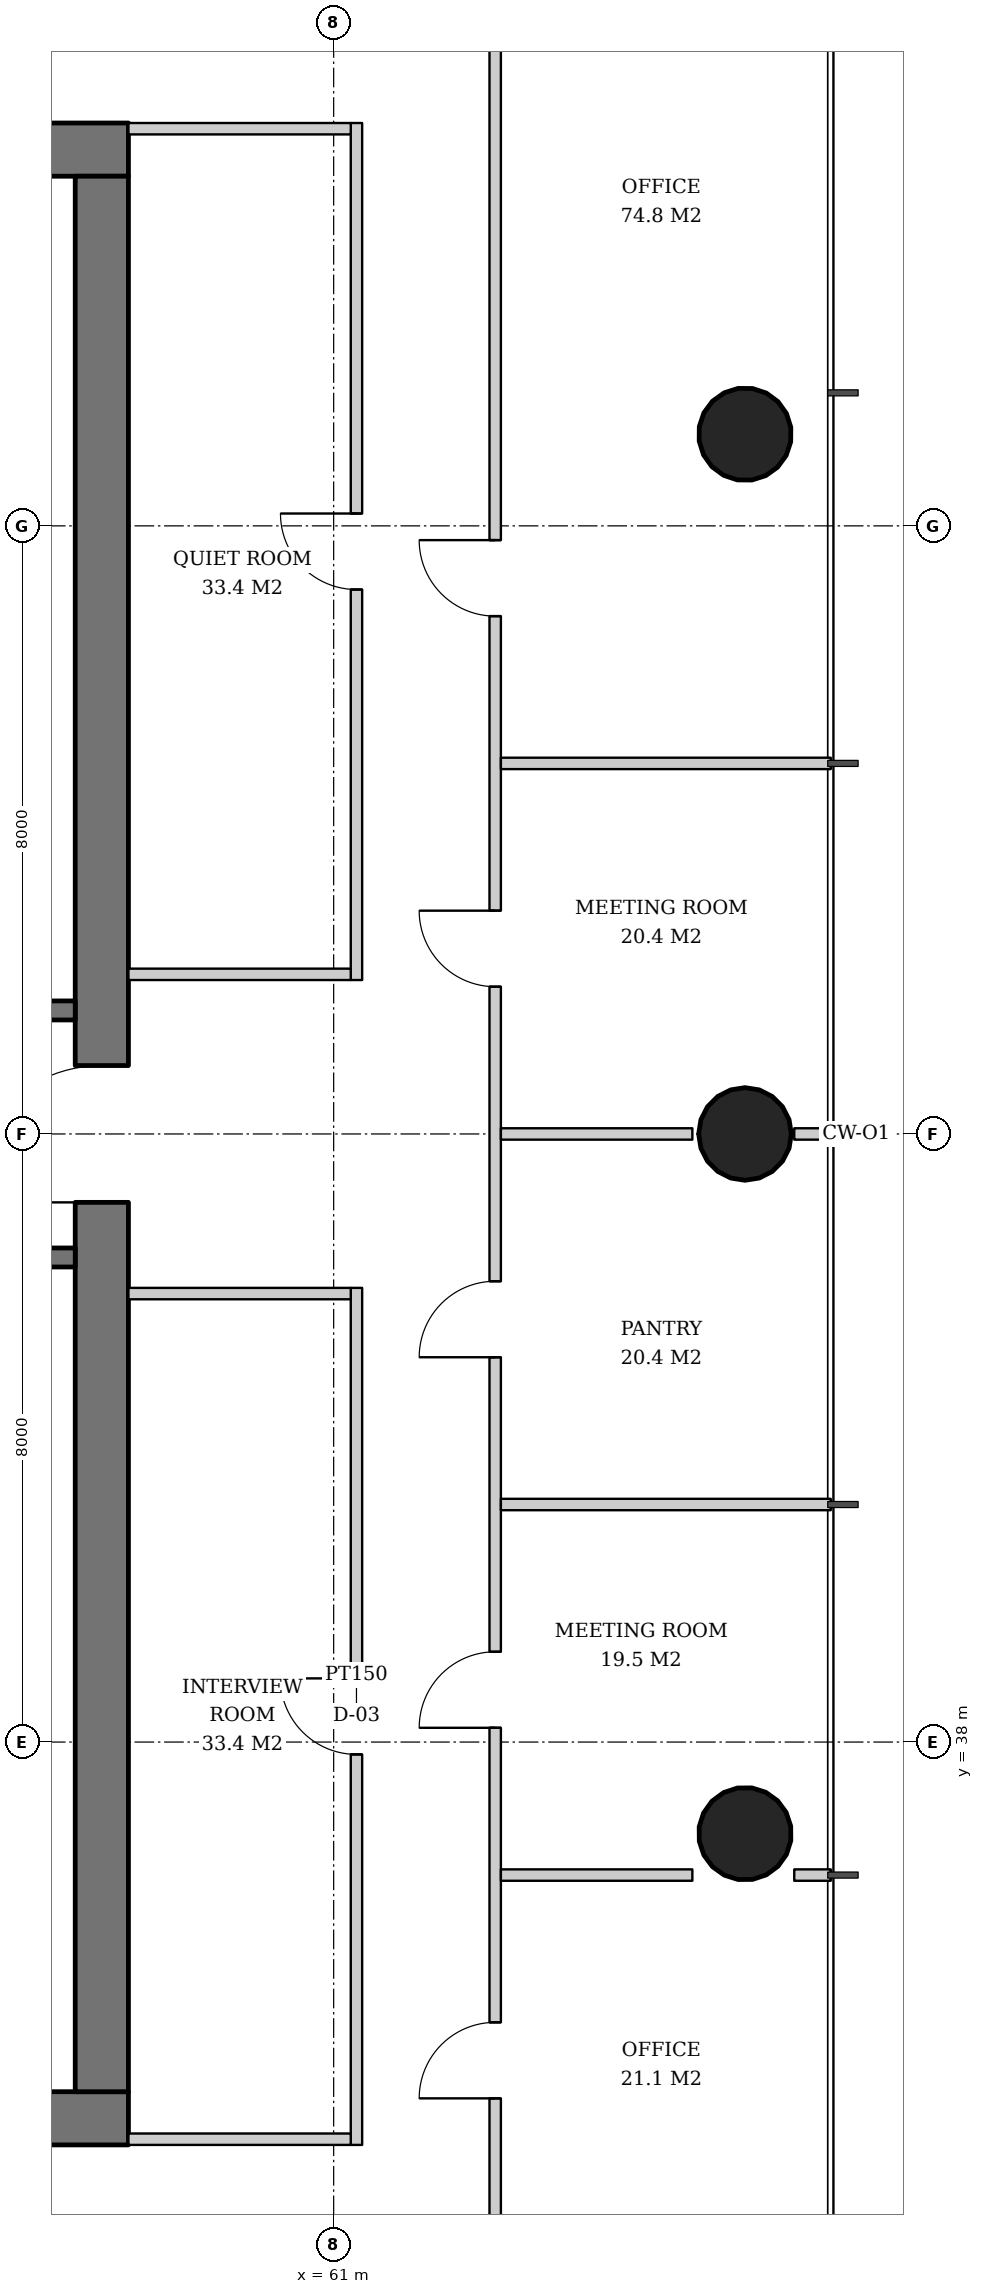
"""IFC4 building model, lengths in metres.
Left out: names, types, materials, properties, quantities, classifications, styles, units other than length and angle.
Written with IfcOpenShell. Run it as: python <this file> out.ifc"""

import sys

from ifc_helpers import new_model, si_unit, direction, frame, frame_2d, origin, origin_2d, place, context, subcontext, project, spatial, rectangle, hollow_circle, extrude, element, fill, save


model = new_model("IFC4")
c1 = context("Model", 3, precision=1e-05, world=origin(), true_north=direction((0.0, 1.0)))
c2 = subcontext(c1, "Body", "Model", "MODEL_VIEW")
j1 = project(units=[si_unit("LENGTHUNIT", "METRE"), si_unit("PLANEANGLEUNIT", "RADIAN")], contexts=[c1])
p1 = place(None, origin())
s1 = spatial("IfcSite", under=j1, at=p1, CompositionType="ELEMENT")
p2 = place(p1, origin())
s2 = spatial("IfcBuilding", under=s1, at=p2, CompositionType="ELEMENT")
p3 = place(p2, frame((0.0, 0.0, 100.8)))
s3 = spatial("IfcBuildingStorey", under=s2, at=p3, CompositionType="ELEMENT", Elevation=100.8)
p4 = place(p3, frame((66.45, 36.775, 0.0), z_axis=(-0.031910269556, 0.015987237665, 0.999362868496), x_axis=(-0.447933021895, -0.894067115991, 0.0)))
e1 = element("IfcColumn", 1, at=p4, inside=s3, PredefinedType="COLUMN", context=c2, shape_type="SweptSolid", body=[
    extrude(hollow_circle(Radius=0.61, WallThickness=0.04, at=origin_2d()), origin(), (0.0, 0.0, 1.0), 3.802),
])
p5 = place(p3, frame((66.45, 46.0, 0.0), z_axis=(-0.031914348339, 0.0, 0.999490607445), x_axis=(0.0, -1.0, 0.0)))
e2 = element("IfcColumn", 2, at=p5, inside=s3, PredefinedType="COLUMN", context=c2, shape_type="SweptSolid", body=[
    extrude(hollow_circle(Radius=0.61, WallThickness=0.04, at=origin_2d()), origin(), (0.0, 0.0, 1.0), 3.802),
])
p6 = place(p3, frame((66.45, 55.225, 0.0), z_axis=(-0.031910269556, -0.015987237665, 0.999362868496), x_axis=(0.447933021895, -0.894067115991, 0.0)))
e3 = element("IfcColumn", 3, at=p6, inside=s3, PredefinedType="COLUMN", context=c2, shape_type="SweptSolid", body=[
    extrude(hollow_circle(Radius=0.61, WallThickness=0.04, at=origin_2d()), origin(), (0.0, 0.0, 1.0), 3.802),
])
p7 = place(p3, frame((31.7, 33.05, 0.0), z_axis=(0.0, 0.0, 1.0), x_axis=(1.0, 0.0, 0.0)))
e4 = element("IfcWall", 4, at=p7, inside=s3, PredefinedType="SHEAR", context=c2, shape_type="SweptSolid", body=[
    extrude(rectangle(XDim=26.6, YDim=0.7, at=frame_2d((13.3, 0.0))), origin(), (0.0, 0.0, 1.0), 3.8),
])
p8 = place(p7, frame((7.3, 0.0, 0.0)))
e5 = element("IfcOpeningElement", 5, at=p8, cuts=e4, PredefinedType="OPENING", context=c2, shape_type="SweptSolid", body=[
    extrude(rectangle(XDim=1.0, YDim=2.1, at=frame_2d((0.5, 1.05))), frame((0.0, 0.36, 0.0), z_axis=(0.0, -1.0, 0.0), x_axis=(1.0, 0.0, 0.0)), (0.0, 0.0, 1.0), 0.72),
])
p9 = place(p7, frame((18.75, 0.0, 0.0)))
e6 = element("IfcOpeningElement", 6, at=p9, cuts=e4, PredefinedType="OPENING", context=c2, shape_type="SweptSolid", body=[
    extrude(rectangle(XDim=1.0, YDim=2.1, at=frame_2d((0.5, 1.05))), frame((0.0, 0.36, 0.0), z_axis=(0.0, -1.0, 0.0), x_axis=(1.0, 0.0, 0.0)), (0.0, 0.0, 1.0), 0.72),
])
p10 = place(p7, frame((3.2, 0.0, 0.0)))
e7 = element("IfcOpeningElement", 7, at=p10, cuts=e4, PredefinedType="OPENING", context=c2, shape_type="SweptSolid", body=[
    extrude(rectangle(XDim=1.0, YDim=2.1, at=frame_2d((0.5, 1.05))), frame((0.0, 0.36, 0.0), z_axis=(0.0, -1.0, 0.0), x_axis=(1.0, 0.0, 0.0)), (0.0, 0.0, 1.0), 0.72),
])
p11 = place(p7, frame((10.42, 0.0, 0.0)))
e8 = element("IfcOpeningElement", 8, at=p11, cuts=e4, PredefinedType="OPENING", context=c2, shape_type="SweptSolid", body=[
    extrude(rectangle(XDim=1.0, YDim=2.1, at=frame_2d((0.5, 1.05))), frame((0.0, 0.36, 0.0), z_axis=(0.0, -1.0, 0.0), x_axis=(1.0, 0.0, 0.0)), (0.0, 0.0, 1.0), 0.72),
])
p12 = place(p7, frame((14.46, 0.0, 0.0)))
e9 = element("IfcOpeningElement", 9, at=p12, cuts=e4, PredefinedType="OPENING", context=c2, shape_type="SweptSolid", body=[
    extrude(rectangle(XDim=1.0, YDim=2.1, at=frame_2d((0.5, 1.05))), frame((0.0, 0.36, 0.0), z_axis=(0.0, -1.0, 0.0), x_axis=(1.0, 0.0, 0.0)), (0.0, 0.0, 1.0), 0.72),
])
p13 = place(p7, frame((22.5, 0.0, 0.0)))
e10 = element("IfcOpeningElement", 10, at=p13, cuts=e4, PredefinedType="OPENING", context=c2, shape_type="SweptSolid", body=[
    extrude(rectangle(XDim=1.0, YDim=2.1, at=frame_2d((0.5, 1.05))), frame((0.0, 0.36, 0.0), z_axis=(0.0, -1.0, 0.0), x_axis=(1.0, 0.0, 0.0)), (0.0, 0.0, 1.0), 0.72),
])
p14 = place(p3, frame((31.7, 58.95, 0.0), z_axis=(0.0, 0.0, 1.0), x_axis=(1.0, 0.0, 0.0)))
e11 = element("IfcWall", 11, at=p14, inside=s3, PredefinedType="SHEAR", context=c2, shape_type="SweptSolid", body=[
    extrude(rectangle(XDim=26.6, YDim=0.7, at=frame_2d((13.3, 0.0))), origin(), (0.0, 0.0, 1.0), 3.8),
])
p15 = place(p14, frame((17.94, 0.0, 0.0)))
e12 = element("IfcOpeningElement", 12, at=p15, cuts=e11, PredefinedType="OPENING", context=c2, shape_type="SweptSolid", body=[
    extrude(rectangle(XDim=1.0, YDim=2.1, at=frame_2d((0.5, 1.05))), frame((0.0, 0.36, 0.0), z_axis=(0.0, -1.0, 0.0), x_axis=(1.0, 0.0, 0.0)), (0.0, 0.0, 1.0), 0.72),
])
p16 = place(p14, frame((5.825, 0.0, 0.0)))
e13 = element("IfcOpeningElement", 13, at=p16, cuts=e11, PredefinedType="OPENING", context=c2, shape_type="SweptSolid", body=[
    extrude(rectangle(XDim=1.0, YDim=2.1, at=frame_2d((0.5, 1.05))), frame((0.0, 0.36, 0.0), z_axis=(0.0, -1.0, 0.0), x_axis=(1.0, 0.0, 0.0)), (0.0, 0.0, 1.0), 0.72),
])
p17 = place(p14, frame((1.169, 0.0, 0.0)))
e14 = element("IfcOpeningElement", 14, at=p17, cuts=e11, PredefinedType="OPENING", context=c2, shape_type="SweptSolid", body=[
    extrude(rectangle(XDim=1.0, YDim=2.1, at=frame_2d((0.5, 1.05))), frame((0.0, 0.36, 0.0), z_axis=(0.0, -1.0, 0.0), x_axis=(1.0, 0.0, 0.0)), (0.0, 0.0, 1.0), 0.72),
])
p18 = place(p14, frame((3.447, 0.0, 0.0)))
e15 = element("IfcOpeningElement", 15, at=p18, cuts=e11, PredefinedType="OPENING", context=c2, shape_type="SweptSolid", body=[
    extrude(rectangle(XDim=1.0, YDim=2.1, at=frame_2d((0.5, 1.05))), frame((0.0, 0.36, 0.0), z_axis=(0.0, -1.0, 0.0), x_axis=(1.0, 0.0, 0.0)), (0.0, 0.0, 1.0), 0.72),
])
p19 = place(p14, frame((11.577, 0.0, 0.0)))
e16 = element("IfcOpeningElement", 16, at=p19, cuts=e11, PredefinedType="OPENING", context=c2, shape_type="SweptSolid", body=[
    extrude(rectangle(XDim=1.0, YDim=2.1, at=frame_2d((0.5, 1.05))), frame((0.0, 0.36, 0.0), z_axis=(0.0, -1.0, 0.0), x_axis=(1.0, 0.0, 0.0)), (0.0, 0.0, 1.0), 0.72),
])
p20 = place(p14, frame((20.9, 0.0, 0.0)))
e17 = element("IfcOpeningElement", 17, at=p20, cuts=e11, PredefinedType="OPENING", context=c2, shape_type="SweptSolid", body=[
    extrude(rectangle(XDim=1.0, YDim=2.1, at=frame_2d((0.5, 1.05))), frame((0.0, 0.36, 0.0), z_axis=(0.0, -1.0, 0.0), x_axis=(1.0, 0.0, 0.0)), (0.0, 0.0, 1.0), 0.72),
])
p21 = place(p14, frame((23.75, 0.0, 0.0)))
e18 = element("IfcOpeningElement", 18, at=p21, cuts=e11, PredefinedType="OPENING", context=c2, shape_type="SweptSolid", body=[
    extrude(rectangle(XDim=1.0, YDim=2.1, at=frame_2d((0.5, 1.05))), frame((0.0, 0.36, 0.0), z_axis=(0.0, -1.0, 0.0), x_axis=(1.0, 0.0, 0.0)), (0.0, 0.0, 1.0), 0.72),
])
p22 = place(p3, frame((57.95, 33.4, 0.0), z_axis=(0.0, 0.0, 1.0), x_axis=(0.0, 1.0, 0.0)))
e19 = element("IfcWall", 19, at=p22, inside=s3, PredefinedType="SHEAR", context=c2, shape_type="SweptSolid", body=[
    extrude(rectangle(XDim=25.2, YDim=0.7, at=frame_2d((12.6, 0.0))), origin(), (0.0, 0.0, 1.0), 3.8),
])
p23 = place(p22, frame((11.7, 0.0, 0.0)))
e20 = element("IfcOpeningElement", 20, at=p23, cuts=e19, PredefinedType="OPENING", context=c2, shape_type="SweptSolid", body=[
    extrude(rectangle(XDim=1.8, YDim=2.4, at=frame_2d((0.9, 1.2))), frame((0.0, 0.36, 0.0), z_axis=(0.0, -1.0, 0.0), x_axis=(1.0, 0.0, 0.0)), (0.0, 0.0, 1.0), 0.72),
])
for number, where, z_axis, x_axis in (
    (21, (54.9, 44.375, 0.0), (0.0, 0.0, 1.0), (1.0, 0.0, 0.0)),
    (22, (54.9, 47.625, 0.0), (0.0, 0.0, 1.0), (1.0, 0.0, 0.0)),
):
    element("IfcWall", number, at=place(p3, frame(where, z_axis=z_axis, x_axis=x_axis)), inside=s3, PredefinedType="SOLIDWALL", context=c2, shape_type="SweptSolid", body=[
        extrude(rectangle(XDim=2.7, YDim=0.25, at=frame_2d((1.35, 0.0))), origin(), (0.0, 0.0, 1.0), 3.62),
    ])
p24 = place(p3, frame((61.3, 32.7, 0.0), z_axis=(0.0, 0.0, 1.0), x_axis=(0.0, 1.0, 0.0)))
e23 = element("IfcWall", 23, at=p24, inside=s3, PredefinedType="PARTITIONING", context=c2, shape_type="SweptSolid", body=[
    extrude(rectangle(XDim=11.275, YDim=0.15, at=frame_2d((5.638, 0.0))), origin(), (0.0, 0.0, 1.0), 2.72),
])
p25 = place(p24, frame((5.137, 0.0, 0.0)))
e24 = element("IfcOpeningElement", 24, at=p25, cuts=e23, PredefinedType="OPENING", context=c2, shape_type="SweptSolid", body=[
    extrude(rectangle(XDim=1.0, YDim=2.1, at=frame_2d((0.5, 1.05))), frame((0.0, 0.085, 0.0), z_axis=(0.0, -1.0, 0.0), x_axis=(1.0, 0.0, 0.0)), (0.0, 0.0, 1.0), 0.17),
])
for number, where, z_axis, x_axis in (
    (25, (58.3, 32.775, 0.0), (0.0, 0.0, 1.0), (1.0, 0.0, 0.0)),
    (26, (58.3, 43.9, 0.0), (0.0, 0.0, 1.0), (1.0, 0.0, 0.0)),
):
    element("IfcWall", number, at=place(p3, frame(where, z_axis=z_axis, x_axis=x_axis)), inside=s3, PredefinedType="PARTITIONING", context=c2, shape_type="SweptSolid", body=[
        extrude(rectangle(XDim=2.925, YDim=0.15, at=frame_2d((1.462, 0.0))), origin(), (0.0, 0.0, 1.0), 3.62),
    ])
p26 = place(p3, frame((61.3, 48.025, 0.0), z_axis=(0.0, 0.0, 1.0), x_axis=(0.0, 1.0, 0.0)))
e27 = element("IfcWall", 27, at=p26, inside=s3, PredefinedType="PARTITIONING", context=c2, shape_type="SweptSolid", body=[
    extrude(rectangle(XDim=11.275, YDim=0.15, at=frame_2d((5.638, 0.0))), origin(), (0.0, 0.0, 1.0), 2.806),
])
p27 = place(p26, frame((5.137, 0.0, 0.0)))
e28 = element("IfcOpeningElement", 28, at=p27, cuts=e27, PredefinedType="OPENING", context=c2, shape_type="SweptSolid", body=[
    extrude(rectangle(XDim=1.0, YDim=2.1, at=frame_2d((0.5, 1.05))), frame((0.0, 0.085, 0.0), z_axis=(0.0, -1.0, 0.0), x_axis=(1.0, 0.0, 0.0)), (0.0, 0.0, 1.0), 0.17),
])
for number, where, z_axis, x_axis in (
    (29, (58.3, 48.1, 0.0), (0.0, 0.0, 1.0), (1.0, 0.0, 0.0)),
    (30, (58.3, 59.225, 0.0), (0.0, 0.0, 1.0), (1.0, 0.0, 0.0)),
):
    element("IfcWall", number, at=place(p3, frame(where, z_axis=z_axis, x_axis=x_axis)), inside=s3, PredefinedType="PARTITIONING", context=c2, shape_type="SweptSolid", body=[
        extrude(rectangle(XDim=2.925, YDim=0.15, at=frame_2d((1.462, 0.0))), origin(), (0.0, 0.0, 1.0), 3.62),
    ])
p28 = place(p3, frame((63.125, 29.789, 0.0), z_axis=(0.0, 0.0, 1.0), x_axis=(0.0, 1.0, 0.0)))
e31 = element("IfcWall", 31, at=p28, inside=s3, PredefinedType="PARTITIONING", context=c2, shape_type="SweptSolid", body=[
    extrude(rectangle(XDim=32.423, YDim=0.15, at=frame_2d((16.211, 0.0))), origin(), (0.0, 0.0, 1.0), 2.72),
])
p29 = place(p28, frame((3.524, 0.0, 0.0)))
e32 = element("IfcOpeningElement", 32, at=p29, cuts=e31, PredefinedType="OPENING", context=c2, shape_type="SweptSolid", body=[
    extrude(rectangle(XDim=1.0, YDim=2.1, at=frame_2d((0.5, 1.05))), frame((0.0, 0.085, 0.0), z_axis=(0.0, -1.0, 0.0), x_axis=(1.0, 0.0, 0.0)), (0.0, 0.0, 1.0), 0.17),
])
p30 = place(p28, frame((8.399, 0.0, 0.0)))
e33 = element("IfcOpeningElement", 33, at=p30, cuts=e31, PredefinedType="OPENING", context=c2, shape_type="SweptSolid", body=[
    extrude(rectangle(XDim=1.0, YDim=2.1, at=frame_2d((0.5, 1.05))), frame((0.0, 0.085, 0.0), z_axis=(0.0, -1.0, 0.0), x_axis=(1.0, 0.0, 0.0)), (0.0, 0.0, 1.0), 0.17),
])
p31 = place(p28, frame((13.274, 0.0, 0.0)))
e34 = element("IfcOpeningElement", 34, at=p31, cuts=e31, PredefinedType="OPENING", context=c2, shape_type="SweptSolid", body=[
    extrude(rectangle(XDim=1.0, YDim=2.1, at=frame_2d((0.5, 1.05))), frame((0.0, 0.085, 0.0), z_axis=(0.0, -1.0, 0.0), x_axis=(1.0, 0.0, 0.0)), (0.0, 0.0, 1.0), 0.17),
])
p32 = place(p28, frame((18.149, 0.0, 0.0)))
e35 = element("IfcOpeningElement", 35, at=p32, cuts=e31, PredefinedType="OPENING", context=c2, shape_type="SweptSolid", body=[
    extrude(rectangle(XDim=1.0, YDim=2.1, at=frame_2d((0.5, 1.05))), frame((0.0, 0.085, 0.0), z_axis=(0.0, -1.0, 0.0), x_axis=(1.0, 0.0, 0.0)), (0.0, 0.0, 1.0), 0.17),
])
p33 = place(p28, frame((23.024, 0.0, 0.0)))
e36 = element("IfcOpeningElement", 36, at=p33, cuts=e31, PredefinedType="OPENING", context=c2, shape_type="SweptSolid", body=[
    extrude(rectangle(XDim=1.0, YDim=2.1, at=frame_2d((0.5, 1.05))), frame((0.0, 0.085, 0.0), z_axis=(0.0, -1.0, 0.0), x_axis=(1.0, 0.0, 0.0)), (0.0, 0.0, 1.0), 0.17),
])
p34 = place(p3, frame((63.2, 36.25, 0.0), z_axis=(0.0, 0.0, 1.0), x_axis=(1.0, 0.0, 0.0)))
e37 = element("IfcWall", 37, at=p34, inside=s3, PredefinedType="PARTITIONING", context=c2, shape_type="SweptSolid", body=[
    extrude(rectangle(XDim=2.519, YDim=0.15, at=frame_2d((1.26, 0.0))), origin(), (0.0, 0.0, 1.0), 3.62),
])
p35 = place(p3, frame((67.06, 36.25, 0.0), z_axis=(0.0, 0.0, 1.0), x_axis=(1.0, 0.0, 0.0)))
e38 = element("IfcWall", 38, at=p35, inside=s3, PredefinedType="PARTITIONING", context=c2, shape_type="SweptSolid", body=[
    extrude(rectangle(XDim=0.48, YDim=0.15, at=frame_2d((0.24, 0.0))), origin(), (0.0, 0.0, 1.0), 3.62),
])
p36 = place(p3, frame((63.2, 41.125, 0.0), z_axis=(0.0, 0.0, 1.0), x_axis=(1.0, 0.0, 0.0)))
e39 = element("IfcWall", 39, at=p36, inside=s3, PredefinedType="PARTITIONING", context=c2, shape_type="SweptSolid", body=[
    extrude(rectangle(XDim=4.34, YDim=0.15, at=frame_2d((2.17, 0.0))), origin(), (0.0, 0.0, 1.0), 2.82),
])
p37 = place(p3, frame((63.2, 46.0, 0.0), z_axis=(0.0, 0.0, 1.0), x_axis=(1.0, 0.0, 0.0)))
e40 = element("IfcWall", 40, at=p37, inside=s3, PredefinedType="PARTITIONING", context=c2, shape_type="SweptSolid", body=[
    extrude(rectangle(XDim=2.519, YDim=0.15, at=frame_2d((1.26, 0.0))), origin(), (0.0, 0.0, 1.0), 2.858),
])
p38 = place(p3, frame((67.06, 46.0, 0.0), z_axis=(0.0, 0.0, 1.0), x_axis=(1.0, 0.0, 0.0)))
e41 = element("IfcWall", 41, at=p38, inside=s3, PredefinedType="PARTITIONING", context=c2, shape_type="SweptSolid", body=[
    extrude(rectangle(XDim=0.48, YDim=0.15, at=frame_2d((0.24, 0.0))), origin(), (0.0, 0.0, 1.0), 3.62),
])
p39 = place(p3, frame((63.2, 50.875, 0.0), z_axis=(0.0, 0.0, 1.0), x_axis=(1.0, 0.0, 0.0)))
e42 = element("IfcWall", 42, at=p39, inside=s3, PredefinedType="PARTITIONING", context=c2, shape_type="SweptSolid", body=[
    extrude(rectangle(XDim=4.34, YDim=0.15, at=frame_2d((2.17, 0.0))), origin(), (0.0, 0.0, 1.0), 2.82),
])
p40 = place(p23, origin())
e43 = element("IfcDoor", 43, at=p40, inside=s3, OperationType="DOUBLE_DOOR_SINGLE_SWING", PredefinedType="DOOR", context=c2, shape_type="SweptSolid", body=[
    extrude(rectangle(XDim=1.8, YDim=2.4, at=frame_2d((0.9, 1.2))), frame((0.0, 0.025, 0.0), z_axis=(0.0, -1.0, 0.0), x_axis=(1.0, 0.0, 0.0)), (0.0, 0.0, 1.0), 0.05),
])
fill(e20, e43)
p41 = place(p25, origin())
e44 = element("IfcDoor", 44, at=p41, inside=s3, OperationType="SINGLE_SWING_RIGHT", PredefinedType="DOOR", context=c2, shape_type="SweptSolid", body=[
    extrude(rectangle(XDim=1.0, YDim=2.1, at=frame_2d((0.5, 1.05))), frame((0.0, 0.025, 0.0), z_axis=(0.0, -1.0, 0.0), x_axis=(1.0, 0.0, 0.0)), (0.0, 0.0, 1.0), 0.05),
])
fill(e24, e44)
p42 = place(p27, origin())
e45 = element("IfcDoor", 45, at=p42, inside=s3, OperationType="SINGLE_SWING_RIGHT", PredefinedType="DOOR", context=c2, shape_type="SweptSolid", body=[
    extrude(rectangle(XDim=1.0, YDim=2.1, at=frame_2d((0.5, 1.05))), frame((0.0, 0.025, 0.0), z_axis=(0.0, -1.0, 0.0), x_axis=(1.0, 0.0, 0.0)), (0.0, 0.0, 1.0), 0.05),
])
fill(e28, e45)
p43 = place(p29, origin())
e46 = element("IfcDoor", 46, at=p43, inside=s3, OperationType="SINGLE_SWING_LEFT", PredefinedType="DOOR", context=c2, shape_type="SweptSolid", body=[
    extrude(rectangle(XDim=1.0, YDim=2.1, at=frame_2d((0.5, 1.05))), frame((0.0, 0.025, 0.0), z_axis=(0.0, -1.0, 0.0), x_axis=(1.0, 0.0, 0.0)), (0.0, 0.0, 1.0), 0.05),
])
fill(e32, e46)
p44 = place(p30, origin())
e47 = element("IfcDoor", 47, at=p44, inside=s3, OperationType="SINGLE_SWING_LEFT", PredefinedType="DOOR", context=c2, shape_type="SweptSolid", body=[
    extrude(rectangle(XDim=1.0, YDim=2.1, at=frame_2d((0.5, 1.05))), frame((0.0, 0.025, 0.0), z_axis=(0.0, -1.0, 0.0), x_axis=(1.0, 0.0, 0.0)), (0.0, 0.0, 1.0), 0.05),
])
fill(e33, e47)
p45 = place(p31, origin())
e48 = element("IfcDoor", 48, at=p45, inside=s3, OperationType="SINGLE_SWING_LEFT", PredefinedType="DOOR", context=c2, shape_type="SweptSolid", body=[
    extrude(rectangle(XDim=1.0, YDim=2.1, at=frame_2d((0.5, 1.05))), frame((0.0, 0.025, 0.0), z_axis=(0.0, -1.0, 0.0), x_axis=(1.0, 0.0, 0.0)), (0.0, 0.0, 1.0), 0.05),
])
fill(e34, e48)
p46 = place(p32, origin())
e49 = element("IfcDoor", 49, at=p46, inside=s3, OperationType="SINGLE_SWING_RIGHT", PredefinedType="DOOR", context=c2, shape_type="SweptSolid", body=[
    extrude(rectangle(XDim=1.0, YDim=2.1, at=frame_2d((0.5, 1.05))), frame((0.0, 0.025, 0.0), z_axis=(0.0, -1.0, 0.0), x_axis=(1.0, 0.0, 0.0)), (0.0, 0.0, 1.0), 0.05),
])
fill(e35, e49)
p47 = place(p33, origin())
e50 = element("IfcDoor", 50, at=p47, inside=s3, OperationType="SINGLE_SWING_RIGHT", PredefinedType="DOOR", context=c2, shape_type="SweptSolid", body=[
    extrude(rectangle(XDim=1.0, YDim=2.1, at=frame_2d((0.5, 1.05))), frame((0.0, 0.025, 0.0), z_axis=(0.0, -1.0, 0.0), x_axis=(1.0, 0.0, 0.0)), (0.0, 0.0, 1.0), 0.05),
])
fill(e36, e50)
save(model, sys.argv[1])
